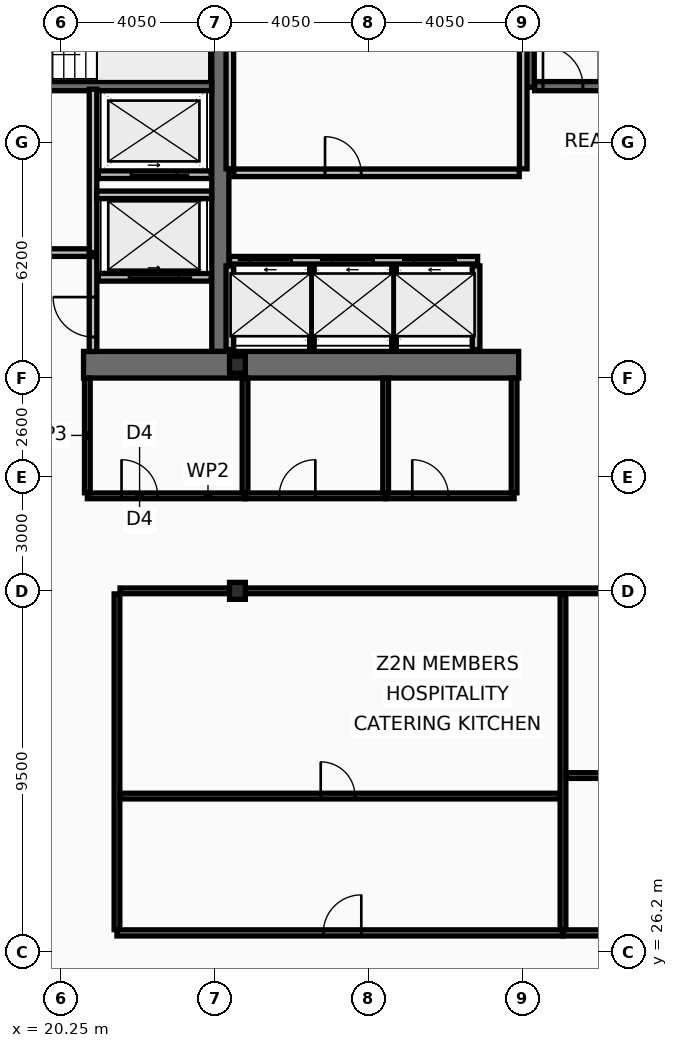
"""IFC4 building model, lengths in metres.
Left out: names, types, materials, properties, quantities, classifications, styles, units other than length and angle.
Written with IfcOpenShell. Run it as: python <this file> out.ifc"""

import sys

from ifc_helpers import new_model, si_unit, direction, frame, frame_2d, origin, origin_2d, place, context, subcontext, project, spatial, rectangle, i_section, extrude, element, fill, save


model = new_model("IFC4")
c1 = context("Model", 3, precision=1e-05, world=origin(), true_north=direction((0.0, 1.0)))
c2 = subcontext(c1, "Body", "Model", "MODEL_VIEW")
j1 = project(units=[si_unit("LENGTHUNIT", "METRE"), si_unit("PLANEANGLEUNIT", "RADIAN")], contexts=[c1])
p1 = place(None, origin())
s1 = spatial("IfcSite", under=j1, at=p1, CompositionType="ELEMENT")
p2 = place(p1, origin())
s2 = spatial("IfcBuilding", under=s1, at=p2, CompositionType="ELEMENT")
p3 = place(p2, frame((0.0, 0.0, 136.2)))
s3 = spatial("IfcBuildingStorey", under=s2, at=p3, CompositionType="ELEMENT", Elevation=136.2)
p4 = place(p3, frame((24.45, 42.0, 0.0), z_axis=(0.0, 0.0, 1.0), x_axis=(0.0, 1.0, 0.0)))
e1 = element("IfcWall", 1, at=p4, inside=s3, PredefinedType="SHEAR", context=c2, shape_type="SweptSolid", body=[
    extrude(rectangle(XDim=11.0, YDim=0.45, at=frame_2d((5.5, 0.0))), origin(), (0.0, 0.0, 1.0), 3.44),
])
p5 = place(p3, frame((32.3, 41.65, 0.0), z_axis=(0.0, 0.0, 1.0), x_axis=(-1.0, 0.0, 0.0)))
e2 = element("IfcWall", 2, at=p5, inside=s3, PredefinedType="SHEAR", context=c2, shape_type="SweptSolid", body=[
    extrude(rectangle(XDim=11.45, YDim=0.7, at=frame_2d((5.725, 0.0))), origin(), (0.0, 0.0, 1.0), 3.44),
])
p6 = place(p3, frame((32.58, 48.95, 0.0), z_axis=(0.0, 0.0, 1.0), x_axis=(0.0, 1.0, 0.0)))
e3 = element("IfcWall", 3, at=p6, inside=s3, PredefinedType="SHEAR", context=c2, shape_type="SweptSolid", body=[
    extrude(rectangle(XDim=4.05, YDim=0.26, at=frame_2d((2.025, 0.0))), origin(), (0.0, 0.0, 1.0), 3.44),
])
p7 = place(p3, frame((16.9, 48.98, 0.0), z_axis=(0.0, 0.0, 1.0), x_axis=(1.0, 0.0, 0.0)))
e4 = element("IfcWall", 4, at=p7, inside=s3, PredefinedType="SHEAR", context=c2, shape_type="SweptSolid", body=[
    extrude(rectangle(XDim=7.32, YDim=0.24, at=frame_2d((3.66, 0.0))), origin(), (0.0, 0.0, 1.0), 3.44),
])
p8 = place(p7, frame((0.22, 0.0, 0.0)))
e5 = element("IfcOpeningElement", 5, at=p8, cuts=e4, PredefinedType="OPENING", context=c2, shape_type="SweptSolid", body=[
    extrude(rectangle(XDim=1.05, YDim=2.15, at=frame_2d((0.525, 1.075))), frame((0.0, 0.13, 0.0), z_axis=(0.0, -1.0, 0.0), x_axis=(1.0, 0.0, 0.0)), (0.0, 0.0, 1.0), 0.26),
])
p9 = place(p3, frame((32.72, 48.98, 0.0), z_axis=(0.0, 0.0, 1.0), x_axis=(1.0, 0.0, 0.0)))
e6 = element("IfcWall", 6, at=p9, inside=s3, PredefinedType="SHEAR", context=c2, shape_type="SweptSolid", body=[
    extrude(rectangle(XDim=7.56, YDim=0.24, at=frame_2d((3.78, 0.0))), origin(), (0.0, 0.0, 1.0), 3.44),
])
p10 = place(p9, frame((0.22, 0.0, 0.0)))
e7 = element("IfcOpeningElement", 7, at=p10, cuts=e6, PredefinedType="OPENING", context=c2, shape_type="SweptSolid", body=[
    extrude(rectangle(XDim=1.05, YDim=2.15, at=frame_2d((0.525, 1.075))), frame((0.0, 0.13, 0.0), z_axis=(0.0, -1.0, 0.0), x_axis=(1.0, 0.0, 0.0)), (0.0, 0.0, 1.0), 0.26),
])
for number, where, z_axis, x_axis in (
    (8, (24.9, 35.7, 0.0), (0.0, 0.0, 1.0), (1.0, 0.0, 0.0)),
    (9, (24.9, 41.65, 0.0), (0.0, 0.0, 1.0), (1.0, 0.0, 0.0)),
):
    element("IfcColumn", number, at=place(p3, frame(where, z_axis=z_axis, x_axis=x_axis)), inside=s3, PredefinedType="COLUMN", context=c2, shape_type="SweptSolid", body=[
        extrude(i_section(OverallWidth=0.416, OverallDepth=0.446, WebThickness=0.039, FlangeThickness=0.063, at=origin_2d()), origin(), (0.0, 0.0, 1.0), 3.6),
    ])
p11 = place(p3, frame((24.69, 44.4, 0.0), z_axis=(0.0, 0.0, 1.0), x_axis=(1.0, 0.0, 0.0)))
e10 = element("IfcWall", 10, at=p11, inside=s3, PredefinedType="PARTITIONING", context=c2, shape_type="SweptSolid", body=[
    extrude(rectangle(XDim=6.53, YDim=0.2, at=frame_2d((3.265, 0.0))), origin(), (0.0, 0.0, 1.0), 3.44),
])
p12 = place(p11, frame((0.53, 0.0, 0.0)))
e11 = element("IfcOpeningElement", 11, at=p12, cuts=e10, PredefinedType="OPENING", context=c2, shape_type="SweptSolid", body=[
    extrude(rectangle(XDim=1.1, YDim=2.18, at=frame_2d((0.55, 1.09))), frame((0.0, 0.11, 0.0), z_axis=(0.0, -1.0, 0.0), x_axis=(1.0, 0.0, 0.0)), (0.0, 0.0, 1.0), 0.22),
])
p13 = place(p11, frame((2.69, 0.0, 0.0)))
e12 = element("IfcOpeningElement", 12, at=p13, cuts=e10, PredefinedType="OPENING", context=c2, shape_type="SweptSolid", body=[
    extrude(rectangle(XDim=1.1, YDim=2.18, at=frame_2d((0.55, 1.09))), frame((0.0, 0.11, 0.0), z_axis=(0.0, -1.0, 0.0), x_axis=(1.0, 0.0, 0.0)), (0.0, 0.0, 1.0), 0.22),
])
p14 = place(p11, frame((4.85, 0.0, 0.0)))
e13 = element("IfcOpeningElement", 13, at=p14, cuts=e10, PredefinedType="OPENING", context=c2, shape_type="SweptSolid", body=[
    extrude(rectangle(XDim=1.1, YDim=2.18, at=frame_2d((0.55, 1.09))), frame((0.0, 0.11, 0.0), z_axis=(0.0, -1.0, 0.0), x_axis=(1.0, 0.0, 0.0)), (0.0, 0.0, 1.0), 0.22),
])
p15 = place(p3, frame((24.21, 43.95, 0.0), z_axis=(0.0, 0.0, 1.0), x_axis=(-1.0, 0.0, 0.0)))
e14 = element("IfcWall", 14, at=p15, inside=s3, PredefinedType="PARTITIONING", context=c2, shape_type="SweptSolid", body=[
    extrude(rectangle(XDim=2.97, YDim=0.2, at=frame_2d((1.485, 0.0))), origin(), (0.0, 0.0, 1.0), 3.44),
])
p16 = place(p15, frame((0.86, 0.0, 0.0)))
e15 = element("IfcOpeningElement", 15, at=p16, cuts=e14, PredefinedType="OPENING", context=c2, shape_type="SweptSolid", body=[
    extrude(rectangle(XDim=1.3, YDim=2.18, at=frame_2d((0.65, 1.09))), frame((0.0, 0.11, 0.0), z_axis=(0.0, -1.0, 0.0), x_axis=(1.0, 0.0, 0.0)), (0.0, 0.0, 1.0), 0.22),
])
p17 = place(p3, frame((24.21, 46.65, 0.0), z_axis=(0.0, 0.0, 1.0), x_axis=(-1.0, 0.0, 0.0)))
e16 = element("IfcWall", 16, at=p17, inside=s3, PredefinedType="PARTITIONING", context=c2, shape_type="SweptSolid", body=[
    extrude(rectangle(XDim=2.97, YDim=0.2, at=frame_2d((1.485, 0.0))), origin(), (0.0, 0.0, 1.0), 3.44),
])
p18 = place(p17, frame((0.91, 0.0, 0.0)))
e17 = element("IfcOpeningElement", 17, at=p18, cuts=e16, PredefinedType="OPENING", context=c2, shape_type="SweptSolid", body=[
    extrude(rectangle(XDim=1.2, YDim=2.18, at=frame_2d((0.6, 1.09))), frame((0.0, 0.11, 0.0), z_axis=(0.0, -1.0, 0.0), x_axis=(1.0, 0.0, 0.0)), (0.0, 0.0, 1.0), 0.22),
])
p19 = place(p3, frame((21.1, 44.6, 0.0), z_axis=(0.0, 0.0, 1.0), x_axis=(0.0, 1.0, 0.0)))
e18 = element("IfcWall", 18, at=p19, inside=s3, PredefinedType="PARTITIONING", context=c2, shape_type="SweptSolid", body=[
    extrude(rectangle(XDim=4.3, YDim=0.2, at=frame_2d((2.15, 0.0))), origin(), (0.0, 0.0, 1.0), 3.44),
])
p20 = place(p3, frame((16.9, 44.6, 0.0), z_axis=(0.0, 0.0, 1.0), x_axis=(1.0, 0.0, 0.0)))
e19 = element("IfcWall", 19, at=p20, inside=s3, PredefinedType="PARTITIONING", context=c2, shape_type="SweptSolid", body=[
    extrude(rectangle(XDim=4.1, YDim=0.2, at=frame_2d((2.05, 0.0))), origin(), (0.0, 0.0, 1.0), 3.44),
])
p21 = place(p20, frame((1.25, 0.0, 0.0)))
e20 = element("IfcOpeningElement", 20, at=p21, cuts=e19, PredefinedType="OPENING", context=c2, shape_type="SweptSolid", body=[
    extrude(rectangle(XDim=1.05, YDim=2.15, at=frame_2d((0.525, 1.075))), frame((0.0, 0.11, 0.0), z_axis=(0.0, -1.0, 0.0), x_axis=(1.0, 0.0, 0.0)), (0.0, 0.0, 1.0), 0.22),
])
p22 = place(p3, frame((21.2, 46.12, 0.0), z_axis=(0.0, 0.0, 1.0), x_axis=(1.0, 0.0, 0.0)))
e21 = element("IfcWall", 21, at=p22, inside=s3, PredefinedType="PARTITIONING", context=c2, shape_type="SweptSolid", body=[
    extrude(rectangle(XDim=3.02, YDim=0.2, at=frame_2d((1.51, 0.0))), origin(), (0.0, 0.0, 1.0), 3.44),
])
p23 = place(p3, frame((21.1, 42.0, 0.0), z_axis=(0.0, 0.0, 1.0), x_axis=(0.0, 1.0, 0.0)))
e22 = element("IfcWall", 22, at=p23, inside=s3, PredefinedType="PARTITIONING", context=c2, shape_type="SweptSolid", body=[
    extrude(rectangle(XDim=2.495, YDim=0.2, at=frame_2d((1.248, 0.0))), origin(), (0.0, 0.0, 1.0), 3.44),
])
p24 = place(p23, frame((0.38, 0.0, 0.0)))
e23 = element("IfcOpeningElement", 23, at=p24, cuts=e22, PredefinedType="OPENING", context=c2, shape_type="SweptSolid", body=[
    extrude(rectangle(XDim=1.05, YDim=2.15, at=frame_2d((0.525, 1.075))), frame((0.0, 0.11, 0.0), z_axis=(0.0, -1.0, 0.0), x_axis=(1.0, 0.0, 0.0)), (0.0, 0.0, 1.0), 0.22),
])
for number, where, z_axis, x_axis in (
    (24, (24.7, 46.805, 0.0), (0.0, 0.0, 1.0), (0.0, 1.0, 0.0)),
    (25, (32.42, 46.805, 0.0), (0.0, 0.0, 1.0), (0.0, 1.0, 0.0)),
):
    element("IfcWall", number, at=place(p3, frame(where, z_axis=z_axis, x_axis=x_axis)), inside=s3, PredefinedType="PARTITIONING", context=c2, shape_type="SweptSolid", body=[
        extrude(rectangle(XDim=5.99, YDim=0.2, at=frame_2d((2.995, 0.0))), origin(), (0.0, 0.0, 1.0), 3.44),
    ])
p25 = place(p3, frame((24.805, 46.7, 0.0), z_axis=(0.0, 0.0, 1.0), x_axis=(1.0, 0.0, 0.0)))
e26 = element("IfcWall", 26, at=p25, inside=s3, PredefinedType="PARTITIONING", context=c2, shape_type="SweptSolid", body=[
    extrude(rectangle(XDim=7.51, YDim=0.2, at=frame_2d((3.755, 0.0))), origin(), (0.0, 0.0, 1.0), 3.44),
])
p26 = place(p25, frame((2.4, 0.0, 0.0)))
e27 = element("IfcOpeningElement", 27, at=p26, cuts=e26, PredefinedType="OPENING", context=c2, shape_type="SweptSolid", body=[
    extrude(rectangle(XDim=0.95, YDim=2.1, at=frame_2d((0.475, 1.05))), frame((0.0, 0.11, 0.0), z_axis=(0.0, -1.0, 0.0), x_axis=(1.0, 0.0, 0.0)), (0.0, 0.0, 1.0), 0.22),
])
for number, where, z_axis, x_axis in (
    (28, (24.7, 42.05, 0.0), (0.0, 0.0, 1.0), (0.0, 1.0, 0.0)),
    (29, (31.18, 42.05, 0.0), (0.0, 0.0, 1.0), (0.0, 1.0, 0.0)),
):
    element("IfcWall", number, at=place(p3, frame(where, z_axis=z_axis, x_axis=x_axis)), inside=s3, PredefinedType="PARTITIONING", context=c2, shape_type="SweptSolid", body=[
        extrude(rectangle(XDim=2.2, YDim=0.2, at=frame_2d((1.1, 0.0))), origin(), (0.0, 0.0, 1.0), 3.44),
    ])
for number, where, z_axis, x_axis in (
    (30, (26.86, 42.05, 0.0), (0.0, 0.0, 1.0), (0.0, 1.0, 0.0)),
    (31, (29.02, 42.05, 0.0), (0.0, 0.0, 1.0), (0.0, 1.0, 0.0)),
):
    element("IfcWall", number, at=place(p3, frame(where, z_axis=z_axis, x_axis=x_axis)), inside=s3, PredefinedType="PARTITIONING", context=c2, shape_type="SweptSolid", body=[
        extrude(rectangle(XDim=2.2, YDim=0.12, at=frame_2d((1.1, 0.0))), origin(), (0.0, 0.0, 1.0), 3.44),
    ])
p27 = place(p3, frame((20.95, 38.2, 0.0), z_axis=(0.0, 0.0, 1.0), x_axis=(1.0, 0.0, 0.0)))
e32 = element("IfcWall", 32, at=p27, inside=s3, PredefinedType="PARTITIONING", context=c2, shape_type="SweptSolid", body=[
    extrude(rectangle(XDim=4.15, YDim=0.15, at=frame_2d((2.075, 0.0))), origin(), (0.0, 0.0, 1.0), 2.73),
])
p28 = place(p27, frame((0.9, 0.0, 0.0)))
e33 = element("IfcOpeningElement", 33, at=p28, cuts=e32, PredefinedType="OPENING", context=c2, shape_type="SweptSolid", body=[
    extrude(rectangle(XDim=0.95, YDim=2.05, at=frame_2d((0.475, 1.025))), frame((0.0, 0.085, 0.0), z_axis=(0.0, -1.0, 0.0), x_axis=(1.0, 0.0, 0.0)), (0.0, 0.0, 1.0), 0.17),
])
p29 = place(p3, frame((25.1, 38.2, 0.0), z_axis=(0.0, 0.0, 1.0), x_axis=(1.0, 0.0, 0.0)))
e34 = element("IfcWall", 34, at=p29, inside=s3, PredefinedType="PARTITIONING", context=c2, shape_type="SweptSolid", body=[
    extrude(rectangle(XDim=3.7, YDim=0.15, at=frame_2d((1.85, 0.0))), origin(), (0.0, 0.0, 1.0), 2.73),
])
p30 = place(p29, frame((0.9, 0.0, 0.0)))
e35 = element("IfcOpeningElement", 35, at=p30, cuts=e34, PredefinedType="OPENING", context=c2, shape_type="SweptSolid", body=[
    extrude(rectangle(XDim=0.95, YDim=2.05, at=frame_2d((0.475, 1.025))), frame((0.0, 0.085, 0.0), z_axis=(0.0, -1.0, 0.0), x_axis=(1.0, 0.0, 0.0)), (0.0, 0.0, 1.0), 0.17),
])
p31 = place(p3, frame((28.8, 38.2, 0.0), z_axis=(0.0, 0.0, 1.0), x_axis=(1.0, 0.0, 0.0)))
e36 = element("IfcWall", 36, at=p31, inside=s3, PredefinedType="PARTITIONING", context=c2, shape_type="SweptSolid", body=[
    extrude(rectangle(XDim=3.38, YDim=0.15, at=frame_2d((1.69, 0.0))), origin(), (0.0, 0.0, 1.0), 2.73),
])
p32 = place(p31, frame((0.7, 0.0, 0.0)))
e37 = element("IfcOpeningElement", 37, at=p32, cuts=e36, PredefinedType="OPENING", context=c2, shape_type="SweptSolid", body=[
    extrude(rectangle(XDim=0.95, YDim=2.05, at=frame_2d((0.475, 1.025))), frame((0.0, 0.085, 0.0), z_axis=(0.0, -1.0, 0.0), x_axis=(1.0, 0.0, 0.0)), (0.0, 0.0, 1.0), 0.17),
])
p33 = place(p3, frame((20.95, 38.28, 0.0), z_axis=(0.0, 0.0, 1.0), x_axis=(0.0, 1.0, 0.0)))
e38 = element("IfcWall", 38, at=p33, inside=s3, PredefinedType="PARTITIONING", context=c2, shape_type="SweptSolid", body=[
    extrude(rectangle(XDim=3.02, YDim=0.15, at=frame_2d((1.51, 0.0))), origin(), (0.0, 0.0, 1.0), 3.44),
])
p34 = place(p3, frame((25.1, 38.28, 0.0), z_axis=(0.0, 0.0, 1.0), x_axis=(0.0, 1.0, 0.0)))
e39 = element("IfcWall", 39, at=p34, inside=s3, PredefinedType="PARTITIONING", context=c2, shape_type="SweptSolid", body=[
    extrude(rectangle(XDim=3.02, YDim=0.15, at=frame_2d((1.51, 0.0))), origin(), (0.0, 0.0, 1.0), 2.73),
])
for number, where, z_axis, x_axis in (
    (40, (28.8, 38.28, 0.0), (0.0, 0.0, 1.0), (0.0, 1.0, 0.0)),
    (41, (32.18, 38.28, 0.0), (0.0, 0.0, 1.0), (0.0, 1.0, 0.0)),
):
    element("IfcWall", number, at=place(p3, frame(where, z_axis=z_axis, x_axis=x_axis)), inside=s3, PredefinedType="PARTITIONING", context=c2, shape_type="SweptSolid", body=[
        extrude(rectangle(XDim=3.02, YDim=0.15, at=frame_2d((1.51, 0.0))), origin(), (0.0, 0.0, 1.0), 3.44),
    ])
p35 = place(p3, frame((21.73, 26.785, 0.0), z_axis=(0.0, 0.0, 1.0), x_axis=(0.0, 1.0, 0.0)))
e42 = element("IfcWall", 42, at=p35, inside=s3, PredefinedType="PARTITIONING", context=c2, shape_type="SweptSolid", body=[
    extrude(rectangle(XDim=8.835, YDim=0.15, at=frame_2d((4.417, 0.0))), origin(), (0.0, 0.0, 1.0), 2.93),
])
p36 = place(p3, frame((21.81, 35.7, 0.0), z_axis=(0.0, 0.0, 1.0), x_axis=(1.0, 0.0, 0.0)))
e43 = element("IfcWall", 43, at=p36, inside=s3, PredefinedType="PARTITIONING", context=c2, shape_type="SweptSolid", body=[
    extrude(rectangle(XDim=44.995, YDim=0.15, at=frame_2d((22.498, 0.0))), origin(), (0.0, 0.0, 1.0), 2.73),
])
p37 = place(p3, frame((21.73, 26.7, 0.0), z_axis=(0.0, 0.0, 1.0), x_axis=(1.0, 0.0, 0.0)))
e44 = element("IfcWall", 44, at=p37, inside=s3, PredefinedType="PARTITIONING", context=c2, shape_type="SweptSolid", body=[
    extrude(rectangle(XDim=11.736, YDim=0.16, at=frame_2d((5.868, 0.0))), origin(), (0.0, 0.0, 1.0), 2.73),
])
p38 = place(p37, frame((5.429, 0.0, 0.0)))
e45 = element("IfcOpeningElement", 45, at=p38, cuts=e44, PredefinedType="OPENING", context=c2, shape_type="SweptSolid", body=[
    extrude(rectangle(XDim=1.0, YDim=2.05, at=frame_2d((0.5, 1.025))), frame((0.0, 0.09, 0.0), z_axis=(0.0, -1.0, 0.0), x_axis=(1.0, 0.0, 0.0)), (0.0, 0.0, 1.0), 0.18),
])
p39 = place(p3, frame((21.81, 30.3, 0.0), z_axis=(0.0, 0.0, 1.0), x_axis=(1.0, 0.0, 0.0)))
e46 = element("IfcWall", 46, at=p39, inside=s3, PredefinedType="PARTITIONING", context=c2, shape_type="SweptSolid", body=[
    extrude(rectangle(XDim=11.576, YDim=0.15, at=frame_2d((5.788, 0.0))), origin(), (0.0, 0.0, 1.0), 2.73),
])
p40 = place(p39, frame((5.281, 0.0, 0.0)))
e47 = element("IfcOpeningElement", 47, at=p40, cuts=e46, PredefinedType="OPENING", context=c2, shape_type="SweptSolid", body=[
    extrude(rectangle(XDim=0.9, YDim=2.05, at=frame_2d((0.45, 1.025))), frame((0.0, 0.085, 0.0), z_axis=(0.0, -1.0, 0.0), x_axis=(1.0, 0.0, 0.0)), (0.0, 0.0, 1.0), 0.17),
])
p41 = place(p3, frame((33.466, 26.7, 0.0), z_axis=(0.0, 0.0, 1.0), x_axis=(1.0, 0.0, 0.0)))
e48 = element("IfcWall", 48, at=p41, inside=s3, PredefinedType="PARTITIONING", context=c2, shape_type="SweptSolid", body=[
    extrude(rectangle(XDim=9.931, YDim=0.16, at=frame_2d((4.965, 0.0))), origin(), (0.0, 0.0, 1.0), 2.73),
])
p42 = place(p41, frame((4.671, 0.0, 0.0)))
e49 = element("IfcOpeningElement", 49, at=p42, cuts=e48, PredefinedType="OPENING", context=c2, shape_type="SweptSolid", body=[
    extrude(rectangle(XDim=1.0, YDim=2.05, at=frame_2d((0.5, 1.025))), frame((0.0, 0.09, 0.0), z_axis=(0.0, -1.0, 0.0), x_axis=(1.0, 0.0, 0.0)), (0.0, 0.0, 1.0), 0.18),
])
p43 = place(p3, frame((33.466, 26.785, 0.0), z_axis=(0.0, 0.0, 1.0), x_axis=(0.0, 1.0, 0.0)))
e50 = element("IfcWall", 50, at=p43, inside=s3, PredefinedType="PARTITIONING", context=c2, shape_type="SweptSolid", body=[
    extrude(rectangle(XDim=8.835, YDim=0.15, at=frame_2d((4.417, 0.0))), origin(), (0.0, 0.0, 1.0), 2.93),
])
p44 = place(p3, frame((33.546, 30.84, 0.0), z_axis=(0.0, 0.0, 1.0), x_axis=(1.0, 0.0, 0.0)))
e51 = element("IfcWall", 51, at=p44, inside=s3, PredefinedType="PARTITIONING", context=c2, shape_type="SweptSolid", body=[
    extrude(rectangle(XDim=9.771, YDim=0.15, at=frame_2d((4.885, 0.0))), origin(), (0.0, 0.0, 1.0), 2.73),
])
p45 = place(p44, frame((4.469, 0.0, 0.0)))
e52 = element("IfcOpeningElement", 52, at=p45, cuts=e51, PredefinedType="OPENING", context=c2, shape_type="SweptSolid", body=[
    extrude(rectangle(XDim=0.9, YDim=2.05, at=frame_2d((0.45, 1.025))), frame((0.0, 0.085, 0.0), z_axis=(0.0, -1.0, 0.0), x_axis=(1.0, 0.0, 0.0)), (0.0, 0.0, 1.0), 0.17),
])
p46 = place(p10, origin())
e53 = element("IfcDoor", 53, at=p46, inside=s3, OperationType="SINGLE_SWING_LEFT", PredefinedType="DOOR", context=c2, shape_type="SweptSolid", body=[
    extrude(rectangle(XDim=1.05, YDim=2.15, at=frame_2d((0.525, 1.075))), frame((0.0, 0.025, 0.0), z_axis=(0.0, -1.0, 0.0), x_axis=(1.0, 0.0, 0.0)), (0.0, 0.0, 1.0), 0.05),
])
fill(e7, e53)
p47 = place(p12, origin())
e54 = element("IfcDoor", 54, at=p47, inside=s3, OperationType="SLIDING_TO_LEFT", PredefinedType="DOOR", context=c2, shape_type="SweptSolid", body=[
    extrude(rectangle(XDim=1.1, YDim=2.18, at=frame_2d((0.55, 1.09))), frame((0.0, 0.025, 0.0), z_axis=(0.0, -1.0, 0.0), x_axis=(1.0, 0.0, 0.0)), (0.0, 0.0, 1.0), 0.05),
])
fill(e11, e54)
p48 = place(p13, origin())
e55 = element("IfcDoor", 55, at=p48, inside=s3, OperationType="SLIDING_TO_LEFT", PredefinedType="DOOR", context=c2, shape_type="SweptSolid", body=[
    extrude(rectangle(XDim=1.1, YDim=2.18, at=frame_2d((0.55, 1.09))), frame((0.0, 0.025, 0.0), z_axis=(0.0, -1.0, 0.0), x_axis=(1.0, 0.0, 0.0)), (0.0, 0.0, 1.0), 0.05),
])
fill(e12, e55)
p49 = place(p14, origin())
e56 = element("IfcDoor", 56, at=p49, inside=s3, OperationType="SLIDING_TO_LEFT", PredefinedType="DOOR", context=c2, shape_type="SweptSolid", body=[
    extrude(rectangle(XDim=1.1, YDim=2.18, at=frame_2d((0.55, 1.09))), frame((0.0, 0.025, 0.0), z_axis=(0.0, -1.0, 0.0), x_axis=(1.0, 0.0, 0.0)), (0.0, 0.0, 1.0), 0.05),
])
fill(e13, e56)
p50 = place(p16, origin())
e57 = element("IfcDoor", 57, at=p50, inside=s3, OperationType="SLIDING_TO_LEFT", PredefinedType="DOOR", context=c2, shape_type="SweptSolid", body=[
    extrude(rectangle(XDim=1.3, YDim=2.18, at=frame_2d((0.65, 1.09))), frame((0.0, 0.025, 0.0), z_axis=(0.0, -1.0, 0.0), x_axis=(1.0, 0.0, 0.0)), (0.0, 0.0, 1.0), 0.05),
])
fill(e15, e57)
p51 = place(p18, origin())
e58 = element("IfcDoor", 58, at=p51, inside=s3, OperationType="SLIDING_TO_LEFT", PredefinedType="DOOR", context=c2, shape_type="SweptSolid", body=[
    extrude(rectangle(XDim=1.2, YDim=2.18, at=frame_2d((0.6, 1.09))), frame((0.0, 0.025, 0.0), z_axis=(0.0, -1.0, 0.0), x_axis=(1.0, 0.0, 0.0)), (0.0, 0.0, 1.0), 0.05),
])
fill(e17, e58)
p52 = place(p24, origin())
e59 = element("IfcDoor", 59, at=p52, inside=s3, OperationType="SINGLE_SWING_RIGHT", PredefinedType="DOOR", context=c2, shape_type="SweptSolid", body=[
    extrude(rectangle(XDim=1.05, YDim=2.15, at=frame_2d((0.525, 1.075))), frame((0.0, 0.025, 0.0), z_axis=(0.0, -1.0, 0.0), x_axis=(1.0, 0.0, 0.0)), (0.0, 0.0, 1.0), 0.05),
])
fill(e23, e59)
p53 = place(p26, origin())
e60 = element("IfcDoor", 60, at=p53, inside=s3, OperationType="SINGLE_SWING_LEFT", PredefinedType="DOOR", context=c2, shape_type="SweptSolid", body=[
    extrude(rectangle(XDim=0.95, YDim=2.1, at=frame_2d((0.475, 1.05))), frame((0.0, 0.025, 0.0), z_axis=(0.0, -1.0, 0.0), x_axis=(1.0, 0.0, 0.0)), (0.0, 0.0, 1.0), 0.05),
])
fill(e27, e60)
p54 = place(p28, origin())
e61 = element("IfcDoor", 61, at=p54, inside=s3, OperationType="SINGLE_SWING_LEFT", PredefinedType="DOOR", context=c2, shape_type="SweptSolid", body=[
    extrude(rectangle(XDim=0.95, YDim=2.05, at=frame_2d((0.475, 1.025))), frame((0.0, 0.025, 0.0), z_axis=(0.0, -1.0, 0.0), x_axis=(1.0, 0.0, 0.0)), (0.0, 0.0, 1.0), 0.05),
])
fill(e33, e61)
p55 = place(p30, origin())
e62 = element("IfcDoor", 62, at=p55, inside=s3, OperationType="SINGLE_SWING_RIGHT", PredefinedType="DOOR", context=c2, shape_type="SweptSolid", body=[
    extrude(rectangle(XDim=0.95, YDim=2.05, at=frame_2d((0.475, 1.025))), frame((0.0, 0.025, 0.0), z_axis=(0.0, -1.0, 0.0), x_axis=(1.0, 0.0, 0.0)), (0.0, 0.0, 1.0), 0.05),
])
fill(e35, e62)
p56 = place(p32, origin())
e63 = element("IfcDoor", 63, at=p56, inside=s3, OperationType="SINGLE_SWING_LEFT", PredefinedType="DOOR", context=c2, shape_type="SweptSolid", body=[
    extrude(rectangle(XDim=0.95, YDim=2.05, at=frame_2d((0.475, 1.025))), frame((0.0, 0.025, 0.0), z_axis=(0.0, -1.0, 0.0), x_axis=(1.0, 0.0, 0.0)), (0.0, 0.0, 1.0), 0.05),
])
fill(e37, e63)
p57 = place(p38, origin())
e64 = element("IfcDoor", 64, at=p57, inside=s3, OperationType="SINGLE_SWING_RIGHT", PredefinedType="DOOR", context=c2, shape_type="SweptSolid", body=[
    extrude(rectangle(XDim=1.0, YDim=2.05, at=frame_2d((0.5, 1.025))), frame((0.0, 0.025, 0.0), z_axis=(0.0, -1.0, 0.0), x_axis=(1.0, 0.0, 0.0)), (0.0, 0.0, 1.0), 0.05),
])
fill(e45, e64)
p58 = place(p40, origin())
e65 = element("IfcDoor", 65, at=p58, inside=s3, OperationType="SINGLE_SWING_LEFT", PredefinedType="DOOR", context=c2, shape_type="SweptSolid", body=[
    extrude(rectangle(XDim=0.9, YDim=2.05, at=frame_2d((0.45, 1.025))), frame((0.0, 0.025, 0.0), z_axis=(0.0, -1.0, 0.0), x_axis=(1.0, 0.0, 0.0)), (0.0, 0.0, 1.0), 0.05),
])
fill(e47, e65)
save(model, sys.argv[1])
